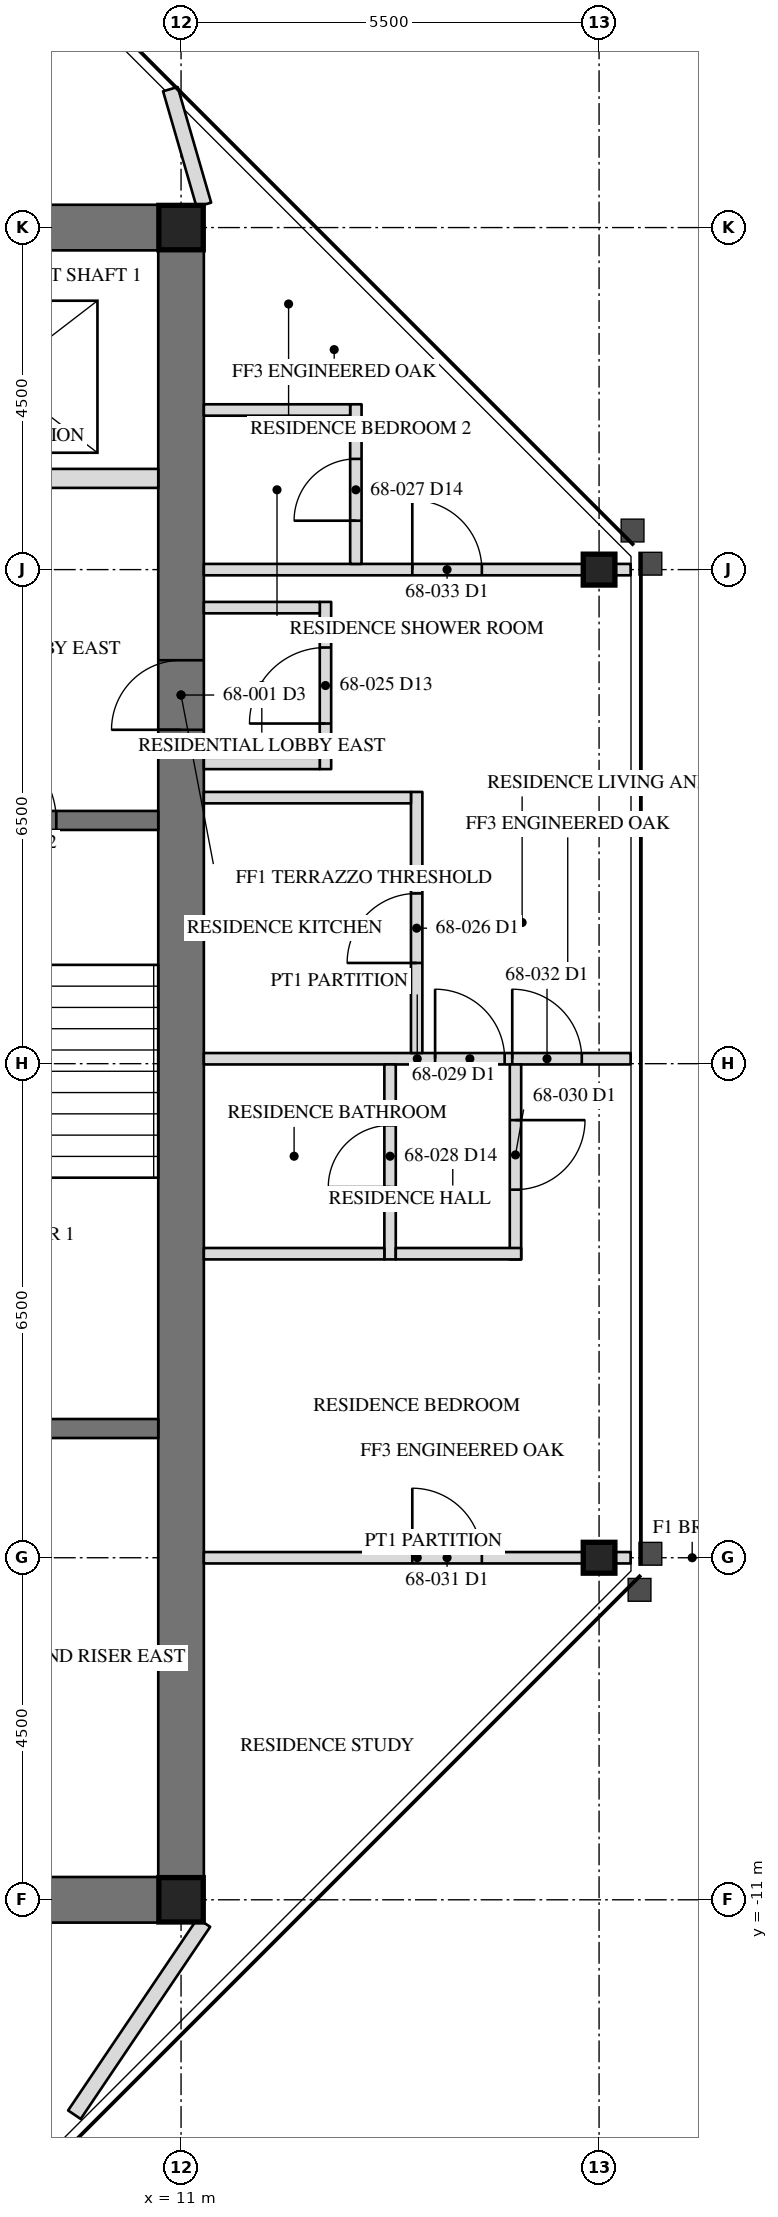
"""IFC4 building model, lengths in metres.
Left out: names, types, materials, properties, quantities, classifications, styles, units other than length and angle.
Written with IfcOpenShell. Run it as: python <this file> out.ifc"""

import sys

from ifc_helpers import new_model, si_unit, direction, frame, frame_2d, origin, origin_2d, place, context, subcontext, project, spatial, rectangle, hollow_rectangle, i_section, extrude, element, fill, save


model = new_model("IFC4")
c1 = context("Model", 3, precision=1e-05, world=origin(), true_north=direction((0.0, 1.0)))
c2 = subcontext(c1, "Body", "Model", "MODEL_VIEW")
j1 = project(units=[si_unit("LENGTHUNIT", "METRE"), si_unit("PLANEANGLEUNIT", "RADIAN")], contexts=[c1])
p1 = place(None, origin())
s1 = spatial("IfcSite", under=j1, at=p1, CompositionType="ELEMENT")
p2 = place(p1, origin())
s2 = spatial("IfcBuilding", under=s1, at=p2, CompositionType="ELEMENT")
p3 = place(p2, frame((0.0, 0.0, 277.6)))
s3 = spatial("IfcBuildingStorey", under=s2, at=p3, CompositionType="ELEMENT", Elevation=277.6)
for number, where, z_axis, x_axis in (
    (1, (16.5, -6.5, 0.0), (0.0, 0.0, 1.0), (0.0, 1.0, 0.0)),
    (2, (16.5, 6.5, 0.0), (0.0, 0.0, 1.0), (0.0, 1.0, 0.0)),
):
    element("IfcColumn", number, at=place(p3, frame(where, z_axis=z_axis, x_axis=x_axis)), inside=s3, PredefinedType="COLUMN", context=c2, shape_type="SweptSolid", body=[
        extrude(i_section(OverallWidth=0.406, OverallDepth=0.417, WebThickness=0.03, FlangeThickness=0.048, at=origin_2d()), origin(), (0.0, 0.0, 1.0), 3.6),
    ])
p4 = place(p3, frame((11.0, -11.0, 0.0), z_axis=(0.0, 0.0, 1.0), x_axis=(0.0, 1.0, 0.0)))
e3 = element("IfcWall", 3, at=p4, inside=s3, PredefinedType="SHEAR", context=c2, shape_type="SweptSolid", body=[
    extrude(rectangle(XDim=22.0, YDim=0.6, at=frame_2d((11.0, 0.0))), origin(), (0.0, 0.0, 1.0), 3.6),
])
p5 = place(p4, frame((15.393, 0.0, 0.0)))
e4 = element("IfcOpeningElement", 4, at=p5, cuts=e3, PredefinedType="OPENING", context=c2, shape_type="SweptSolid", body=[
    extrude(rectangle(XDim=0.915, YDim=2.134, at=frame_2d((0.458, 1.067))), frame((0.0, 0.31, 0.0), z_axis=(0.0, -1.0, 0.0), x_axis=(1.0, 0.0, 0.0)), (0.0, 0.0, 1.0), 0.62),
])
for number, where, z_axis, x_axis in (
    (5, (11.0, 11.0, 0.0), (0.0, 0.0, 1.0), (-1.0, 0.0, 0.0)),
    (6, (6.5, -11.0, 0.0), (0.0, 0.0, 1.0), (1.0, 0.0, 0.0)),
):
    element("IfcWall", number, at=place(p3, frame(where, z_axis=z_axis, x_axis=x_axis)), inside=s3, PredefinedType="SHEAR", context=c2, shape_type="SweptSolid", body=[
        extrude(rectangle(XDim=4.5, YDim=0.6, at=frame_2d((2.25, 0.0))), origin(), (0.0, 0.0, 1.0), 3.6),
    ])
for number, where, z_axis, x_axis in (
    (7, (11.0, 11.0, 0.0), (0.0, 0.0, 1.0), (1.0, 0.0, 0.0)),
    (8, (11.0, -11.0, 0.0), (0.0, 0.0, 1.0), (1.0, 0.0, 0.0)),
):
    element("IfcColumn", number, at=place(p3, frame(where, z_axis=z_axis, x_axis=x_axis)), inside=s3, PredefinedType="COLUMN", context=c2, shape_type="SweptSolid", body=[
        extrude(hollow_rectangle(XDim=0.584, YDim=0.584, WallThickness=0.051, at=origin_2d()), origin(), (0.0, 0.0, 1.0), 3.6),
    ])
p6 = place(p3, frame((6.95, -4.8, 0.0), z_axis=(0.0, 0.0, 1.0), x_axis=(1.0, 0.0, 0.0)))
e9 = element("IfcWall", 9, at=p6, inside=s3, PredefinedType="SOLIDWALL", context=c2, shape_type="SweptSolid", body=[
    extrude(rectangle(XDim=3.75, YDim=0.25, at=frame_2d((1.875, 0.0))), origin(), (0.0, 0.0, 1.0), 3.41),
])
p7 = place(p3, frame((6.95, 3.2, 0.0), z_axis=(0.0, 0.0, 1.0), x_axis=(1.0, 0.0, 0.0)))
e10 = element("IfcWall", 10, at=p7, inside=s3, PredefinedType="SOLIDWALL", context=c2, shape_type="SweptSolid", body=[
    extrude(rectangle(XDim=3.75, YDim=0.25, at=frame_2d((1.875, 0.0))), origin(), (0.0, 0.0, 1.0), 3.41),
])
p8 = place(p7, frame((1.342, 0.0, 0.0)))
e11 = element("IfcOpeningElement", 11, at=p8, cuts=e10, PredefinedType="OPENING", context=c2, shape_type="SweptSolid", body=[
    extrude(rectangle(XDim=1.067, YDim=2.134, at=frame_2d((0.533, 1.067))), frame((0.0, 0.135, 0.0), z_axis=(0.0, -1.0, 0.0), x_axis=(1.0, 0.0, 0.0)), (0.0, 0.0, 1.0), 0.27),
])
p9 = place(p3, frame((6.95, 7.7, 0.0), z_axis=(0.0, 0.0, 1.0), x_axis=(1.0, 0.0, 0.0)))
e12 = element("IfcWall", 12, at=p9, inside=s3, PredefinedType="PARTITIONING", context=c2, shape_type="SweptSolid", body=[
    extrude(rectangle(XDim=3.75, YDim=0.25, at=frame_2d((1.875, 0.0))), origin(), (0.0, 0.0, 1.0), 3.41),
])
p10 = place(p9, frame((0.45, 0.0, 0.0)))
e13 = element("IfcOpeningElement", 13, at=p10, cuts=e12, PredefinedType="OPENING", context=c2, shape_type="SweptSolid", body=[
    extrude(rectangle(XDim=1.219, YDim=2.134, at=frame_2d((0.609, 1.067))), frame((0.0, 0.135, 0.0), z_axis=(0.0, -1.0, 0.0), x_axis=(1.0, 0.0, 0.0)), (0.0, 0.0, 1.0), 0.27),
])
p11 = place(p3, frame((11.3, 11.3, 0.0), z_axis=(0.0, 0.0, 1.0), x_axis=(-0.278099250491, 0.960552344683, 0.0)))
e14 = element("IfcWall", 14, at=p11, inside=s3, PredefinedType="PARTITIONING", context=c2, shape_type="SweptSolid", body=[
    extrude(rectangle(XDim=1.584, YDim=0.2, at=frame_2d((0.792, 0.0))), origin(), (0.0, 0.0, 1.0), 3.41),
])
p12 = place(p3, frame((11.3, -11.3, 0.0), z_axis=(0.0, 0.0, 1.0), x_axis=(-0.558834300538, -0.829279340477, 0.0)))
e15 = element("IfcWall", 15, at=p12, inside=s3, PredefinedType="PARTITIONING", context=c2, shape_type="SweptSolid", body=[
    extrude(rectangle(XDim=3.048, YDim=0.2, at=frame_2d((1.524, 0.0))), origin(), (0.0, 0.0, 1.0), 2.704),
])
p13 = place(p3, frame((11.3, -6.5, 0.0), z_axis=(0.0, 0.0, 1.0), x_axis=(1.0, 0.0, 0.0)))
e16 = element("IfcWall", 16, at=p13, inside=s3, PredefinedType="PARTITIONING", context=c2, shape_type="SweptSolid", body=[
    extrude(rectangle(XDim=5.615, YDim=0.15, at=frame_2d((2.808, 0.0))), origin(), (0.0, 0.0, 1.0), 2.966),
])
p14 = place(p13, frame((2.742, 0.0, 0.0)))
e17 = element("IfcOpeningElement", 17, at=p14, cuts=e16, PredefinedType="OPENING", context=c2, shape_type="SweptSolid", body=[
    extrude(rectangle(XDim=0.915, YDim=2.134, at=frame_2d((0.458, 1.067))), frame((0.0, 0.085, 0.0), z_axis=(0.0, -1.0, 0.0), x_axis=(1.0, 0.0, 0.0)), (0.0, 0.0, 1.0), 0.17),
])
p15 = place(p3, frame((11.3, 0.065, 0.0), z_axis=(0.0, 0.0, 1.0), x_axis=(1.0, 0.0, 0.0)))
e18 = element("IfcWall", 18, at=p15, inside=s3, PredefinedType="PARTITIONING", context=c2, shape_type="SweptSolid", body=[
    extrude(rectangle(XDim=5.615, YDim=0.15, at=frame_2d((2.808, 0.0))), origin(), (0.0, 0.0, 1.0), 2.709),
])
p16 = place(p15, frame((3.042, 0.0, 0.0)))
e19 = element("IfcOpeningElement", 19, at=p16, cuts=e18, PredefinedType="OPENING", context=c2, shape_type="SweptSolid", body=[
    extrude(rectangle(XDim=0.915, YDim=2.134, at=frame_2d((0.458, 1.067))), frame((0.0, 0.085, 0.0), z_axis=(0.0, -1.0, 0.0), x_axis=(1.0, 0.0, 0.0)), (0.0, 0.0, 1.0), 0.17),
])
p17 = place(p15, frame((4.058, 0.0, 0.0)))
e20 = element("IfcOpeningElement", 20, at=p17, cuts=e18, PredefinedType="OPENING", context=c2, shape_type="SweptSolid", body=[
    extrude(rectangle(XDim=0.915, YDim=2.134, at=frame_2d((0.458, 1.067))), frame((0.0, 0.085, 0.0), z_axis=(0.0, -1.0, 0.0), x_axis=(1.0, 0.0, 0.0)), (0.0, 0.0, 1.0), 0.17),
])
p18 = place(p3, frame((11.3, 6.5, 0.0), z_axis=(0.0, 0.0, 1.0), x_axis=(1.0, 0.0, 0.0)))
e21 = element("IfcWall", 21, at=p18, inside=s3, PredefinedType="PARTITIONING", context=c2, shape_type="SweptSolid", body=[
    extrude(rectangle(XDim=5.615, YDim=0.15, at=frame_2d((2.808, 0.0))), origin(), (0.0, 0.0, 1.0), 2.966),
])
p19 = place(p18, frame((2.742, 0.0, 0.0)))
e22 = element("IfcOpeningElement", 22, at=p19, cuts=e21, PredefinedType="OPENING", context=c2, shape_type="SweptSolid", body=[
    extrude(rectangle(XDim=0.915, YDim=2.134, at=frame_2d((0.458, 1.067))), frame((0.0, 0.085, 0.0), z_axis=(0.0, -1.0, 0.0), x_axis=(1.0, 0.0, 0.0)), (0.0, 0.0, 1.0), 0.17),
])
p20 = place(p3, frame((12.9, 3.875, 0.0), z_axis=(0.0, 0.0, 1.0), x_axis=(0.0, 1.0, 0.0)))
e23 = element("IfcWall", 23, at=p20, inside=s3, PredefinedType="PARTITIONING", context=c2, shape_type="SweptSolid", body=[
    extrude(rectangle(XDim=2.2, YDim=0.15, at=frame_2d((1.1, 0.0))), origin(), (0.0, 0.0, 1.0), 3.41),
])
p21 = place(p20, frame((0.6, 0.0, 0.0)))
e24 = element("IfcOpeningElement", 24, at=p21, cuts=e23, PredefinedType="OPENING", context=c2, shape_type="SweptSolid", body=[
    extrude(rectangle(XDim=1.0, YDim=2.134, at=frame_2d((0.5, 1.067))), frame((0.0, 0.085, 0.0), z_axis=(0.0, -1.0, 0.0), x_axis=(1.0, 0.0, 0.0)), (0.0, 0.0, 1.0), 0.17),
])
for number, where, z_axis, x_axis in (
    (25, (11.3, 3.95, 0.0), (0.0, 0.0, 1.0), (1.0, 0.0, 0.0)),
    (26, (11.3, 6.0, 0.0), (0.0, 0.0, 1.0), (1.0, 0.0, 0.0)),
):
    element("IfcWall", number, at=place(p3, frame(where, z_axis=z_axis, x_axis=x_axis)), inside=s3, PredefinedType="PARTITIONING", context=c2, shape_type="SweptSolid", body=[
        extrude(rectangle(XDim=1.525, YDim=0.15, at=frame_2d((0.762, 0.0))), origin(), (0.0, 0.0, 1.0), 3.41),
    ])
p22 = place(p3, frame((14.1, 0.14, 0.0), z_axis=(0.0, 0.0, 1.0), x_axis=(0.0, 1.0, 0.0)))
e27 = element("IfcWall", 27, at=p22, inside=s3, PredefinedType="PARTITIONING", context=c2, shape_type="SweptSolid", body=[
    extrude(rectangle(XDim=3.435, YDim=0.15, at=frame_2d((1.718, 0.0))), origin(), (0.0, 0.0, 1.0), 3.41),
])
p23 = place(p22, frame((1.185, 0.0, 0.0)))
e28 = element("IfcOpeningElement", 28, at=p23, cuts=e27, PredefinedType="OPENING", context=c2, shape_type="SweptSolid", body=[
    extrude(rectangle(XDim=0.915, YDim=2.134, at=frame_2d((0.458, 1.067))), frame((0.0, 0.085, 0.0), z_axis=(0.0, -1.0, 0.0), x_axis=(1.0, 0.0, 0.0)), (0.0, 0.0, 1.0), 0.17),
])
p24 = place(p3, frame((11.3, 3.5, 0.0), z_axis=(0.0, 0.0, 1.0), x_axis=(1.0, 0.0, 0.0)))
e29 = element("IfcWall", 29, at=p24, inside=s3, PredefinedType="PARTITIONING", context=c2, shape_type="SweptSolid", body=[
    extrude(rectangle(XDim=2.725, YDim=0.15, at=frame_2d((1.362, 0.0))), origin(), (0.0, 0.0, 1.0), 3.41),
])
p25 = place(p3, frame((13.3, 6.575, 0.0), z_axis=(0.0, 0.0, 1.0), x_axis=(0.0, 1.0, 0.0)))
e30 = element("IfcWall", 30, at=p25, inside=s3, PredefinedType="PARTITIONING", context=c2, shape_type="SweptSolid", body=[
    extrude(rectangle(XDim=2.1, YDim=0.15, at=frame_2d((1.05, 0.0))), origin(), (0.0, 0.0, 1.0), 3.41),
])
p26 = place(p25, frame((0.569, 0.0, 0.0)))
e31 = element("IfcOpeningElement", 31, at=p26, cuts=e30, PredefinedType="OPENING", context=c2, shape_type="SweptSolid", body=[
    extrude(rectangle(XDim=0.813, YDim=2.032, at=frame_2d((0.406, 1.016))), frame((0.0, 0.085, 0.0), z_axis=(0.0, -1.0, 0.0), x_axis=(1.0, 0.0, 0.0)), (0.0, 0.0, 1.0), 0.17),
])
p27 = place(p3, frame((11.3, 8.6, 0.0), z_axis=(0.0, 0.0, 1.0), x_axis=(1.0, 0.0, 0.0)))
e32 = element("IfcWall", 32, at=p27, inside=s3, PredefinedType="PARTITIONING", context=c2, shape_type="SweptSolid", body=[
    extrude(rectangle(XDim=1.925, YDim=0.15, at=frame_2d((0.962, 0.0))), origin(), (0.0, 0.0, 1.0), 3.41),
])
p28 = place(p3, frame((13.75, -2.575, 0.0), z_axis=(0.0, 0.0, 1.0), x_axis=(0.0, 1.0, 0.0)))
e33 = element("IfcWall", 33, at=p28, inside=s3, PredefinedType="PARTITIONING", context=c2, shape_type="SweptSolid", body=[
    extrude(rectangle(XDim=2.565, YDim=0.15, at=frame_2d((1.282, 0.0))), origin(), (0.0, 0.0, 1.0), 3.41),
])
p29 = place(p28, frame((0.951, 0.0, 0.0)))
e34 = element("IfcOpeningElement", 34, at=p29, cuts=e33, PredefinedType="OPENING", context=c2, shape_type="SweptSolid", body=[
    extrude(rectangle(XDim=0.813, YDim=2.032, at=frame_2d((0.406, 1.016))), frame((0.0, 0.085, 0.0), z_axis=(0.0, -1.0, 0.0), x_axis=(1.0, 0.0, 0.0)), (0.0, 0.0, 1.0), 0.17),
])
p30 = place(p3, frame((11.3, -2.5, 0.0), z_axis=(0.0, 0.0, 1.0), x_axis=(1.0, 0.0, 0.0)))
e35 = element("IfcWall", 35, at=p30, inside=s3, PredefinedType="PARTITIONING", context=c2, shape_type="SweptSolid", body=[
    extrude(rectangle(XDim=2.375, YDim=0.15, at=frame_2d((1.188, 0.0))), origin(), (0.0, 0.0, 1.0), 3.41),
])
p31 = place(p3, frame((15.4, -0.01, 0.0), z_axis=(0.0, 0.0, 1.0), x_axis=(0.0, -1.0, 0.0)))
e36 = element("IfcWall", 36, at=p31, inside=s3, PredefinedType="PARTITIONING", context=c2, shape_type="SweptSolid", body=[
    extrude(rectangle(XDim=2.565, YDim=0.15, at=frame_2d((1.282, 0.0))), origin(), (0.0, 0.0, 1.0), 3.41),
])
p32 = place(p31, frame((0.732, 0.0, 0.0)))
e37 = element("IfcOpeningElement", 37, at=p32, cuts=e36, PredefinedType="OPENING", context=c2, shape_type="SweptSolid", body=[
    extrude(rectangle(XDim=0.915, YDim=2.134, at=frame_2d((0.458, 1.067))), frame((0.0, 0.085, 0.0), z_axis=(0.0, -1.0, 0.0), x_axis=(1.0, 0.0, 0.0)), (0.0, 0.0, 1.0), 0.17),
])
p33 = place(p3, frame((13.825, -2.5, 0.0), z_axis=(0.0, 0.0, 1.0), x_axis=(1.0, 0.0, 0.0)))
e38 = element("IfcWall", 38, at=p33, inside=s3, PredefinedType="PARTITIONING", context=c2, shape_type="SweptSolid", body=[
    extrude(rectangle(XDim=1.65, YDim=0.15, at=frame_2d((0.825, 0.0))), origin(), (0.0, 0.0, 1.0), 3.41),
])
p34 = place(p5, origin())
e39 = element("IfcDoor", 39, at=p34, inside=s3, OperationType="SINGLE_SWING_RIGHT", PredefinedType="DOOR", context=c2, shape_type="SweptSolid", body=[
    extrude(rectangle(XDim=0.915, YDim=2.134, at=frame_2d((0.458, 1.067))), frame((0.0, -0.225, 0.0), z_axis=(0.0, -1.0, 0.0), x_axis=(1.0, 0.0, 0.0)), (0.0, 0.0, 1.0), 0.05),
])
fill(e4, e39)
p35 = place(p8, origin())
e40 = element("IfcDoor", 40, at=p35, inside=s3, OperationType="SINGLE_SWING_LEFT", PredefinedType="DOOR", context=c2, shape_type="SweptSolid", body=[
    extrude(rectangle(XDim=1.067, YDim=2.134, at=frame_2d((0.533, 1.067))), frame((0.0, 0.025, 0.0), z_axis=(0.0, -1.0, 0.0), x_axis=(1.0, 0.0, 0.0)), (0.0, 0.0, 1.0), 0.05),
])
fill(e11, e40)
p36 = place(p21, origin())
e41 = element("IfcDoor", 41, at=p36, inside=s3, OperationType="SINGLE_SWING_RIGHT", PredefinedType="DOOR", context=c2, shape_type="SweptSolid", body=[
    extrude(rectangle(XDim=1.0, YDim=2.134, at=frame_2d((0.5, 1.067))), frame((0.0, 0.025, 0.0), z_axis=(0.0, -1.0, 0.0), x_axis=(1.0, 0.0, 0.0)), (0.0, 0.0, 1.0), 0.05),
])
fill(e24, e41)
p37 = place(p23, origin())
e42 = element("IfcDoor", 42, at=p37, inside=s3, OperationType="SINGLE_SWING_LEFT", PredefinedType="DOOR", context=c2, shape_type="SweptSolid", body=[
    extrude(rectangle(XDim=0.915, YDim=2.134, at=frame_2d((0.458, 1.067))), frame((0.0, 0.025, 0.0), z_axis=(0.0, -1.0, 0.0), x_axis=(1.0, 0.0, 0.0)), (0.0, 0.0, 1.0), 0.05),
])
fill(e28, e42)
p38 = place(p26, origin())
e43 = element("IfcDoor", 43, at=p38, inside=s3, OperationType="SINGLE_SWING_LEFT", PredefinedType="DOOR", context=c2, shape_type="SweptSolid", body=[
    extrude(rectangle(XDim=0.813, YDim=2.032, at=frame_2d((0.406, 1.016))), frame((0.0, 0.025, 0.0), z_axis=(0.0, -1.0, 0.0), x_axis=(1.0, 0.0, 0.0)), (0.0, 0.0, 1.0), 0.05),
])
fill(e31, e43)
p39 = place(p29, origin())
e44 = element("IfcDoor", 44, at=p39, inside=s3, OperationType="SINGLE_SWING_LEFT", PredefinedType="DOOR", context=c2, shape_type="SweptSolid", body=[
    extrude(rectangle(XDim=0.813, YDim=2.032, at=frame_2d((0.406, 1.016))), frame((0.0, 0.025, 0.0), z_axis=(0.0, -1.0, 0.0), x_axis=(1.0, 0.0, 0.0)), (0.0, 0.0, 1.0), 0.05),
])
fill(e34, e44)
p40 = place(p16, origin())
e45 = element("IfcDoor", 45, at=p40, inside=s3, OperationType="SINGLE_SWING_LEFT", PredefinedType="DOOR", context=c2, shape_type="SweptSolid", body=[
    extrude(rectangle(XDim=0.915, YDim=2.134, at=frame_2d((0.458, 1.067))), frame((0.0, 0.025, 0.0), z_axis=(0.0, -1.0, 0.0), x_axis=(1.0, 0.0, 0.0)), (0.0, 0.0, 1.0), 0.05),
])
fill(e19, e45)
p41 = place(p32, origin())
e46 = element("IfcDoor", 46, at=p41, inside=s3, OperationType="SINGLE_SWING_LEFT", PredefinedType="DOOR", context=c2, shape_type="SweptSolid", body=[
    extrude(rectangle(XDim=0.915, YDim=2.134, at=frame_2d((0.458, 1.067))), frame((0.0, 0.025, 0.0), z_axis=(0.0, -1.0, 0.0), x_axis=(1.0, 0.0, 0.0)), (0.0, 0.0, 1.0), 0.05),
])
fill(e37, e46)
p42 = place(p14, origin())
e47 = element("IfcDoor", 47, at=p42, inside=s3, OperationType="SINGLE_SWING_LEFT", PredefinedType="DOOR", context=c2, shape_type="SweptSolid", body=[
    extrude(rectangle(XDim=0.915, YDim=2.134, at=frame_2d((0.458, 1.067))), frame((0.0, 0.025, 0.0), z_axis=(0.0, -1.0, 0.0), x_axis=(1.0, 0.0, 0.0)), (0.0, 0.0, 1.0), 0.05),
])
fill(e17, e47)
p43 = place(p17, origin())
e48 = element("IfcDoor", 48, at=p43, inside=s3, OperationType="SINGLE_SWING_LEFT", PredefinedType="DOOR", context=c2, shape_type="SweptSolid", body=[
    extrude(rectangle(XDim=0.915, YDim=2.134, at=frame_2d((0.458, 1.067))), frame((0.0, 0.025, 0.0), z_axis=(0.0, -1.0, 0.0), x_axis=(1.0, 0.0, 0.0)), (0.0, 0.0, 1.0), 0.05),
])
fill(e20, e48)
p44 = place(p19, origin())
e49 = element("IfcDoor", 49, at=p44, inside=s3, OperationType="SINGLE_SWING_LEFT", PredefinedType="DOOR", context=c2, shape_type="SweptSolid", body=[
    extrude(rectangle(XDim=0.915, YDim=2.134, at=frame_2d((0.458, 1.067))), frame((0.0, 0.025, 0.0), z_axis=(0.0, -1.0, 0.0), x_axis=(1.0, 0.0, 0.0)), (0.0, 0.0, 1.0), 0.05),
])
fill(e22, e49)
save(model, sys.argv[1])
